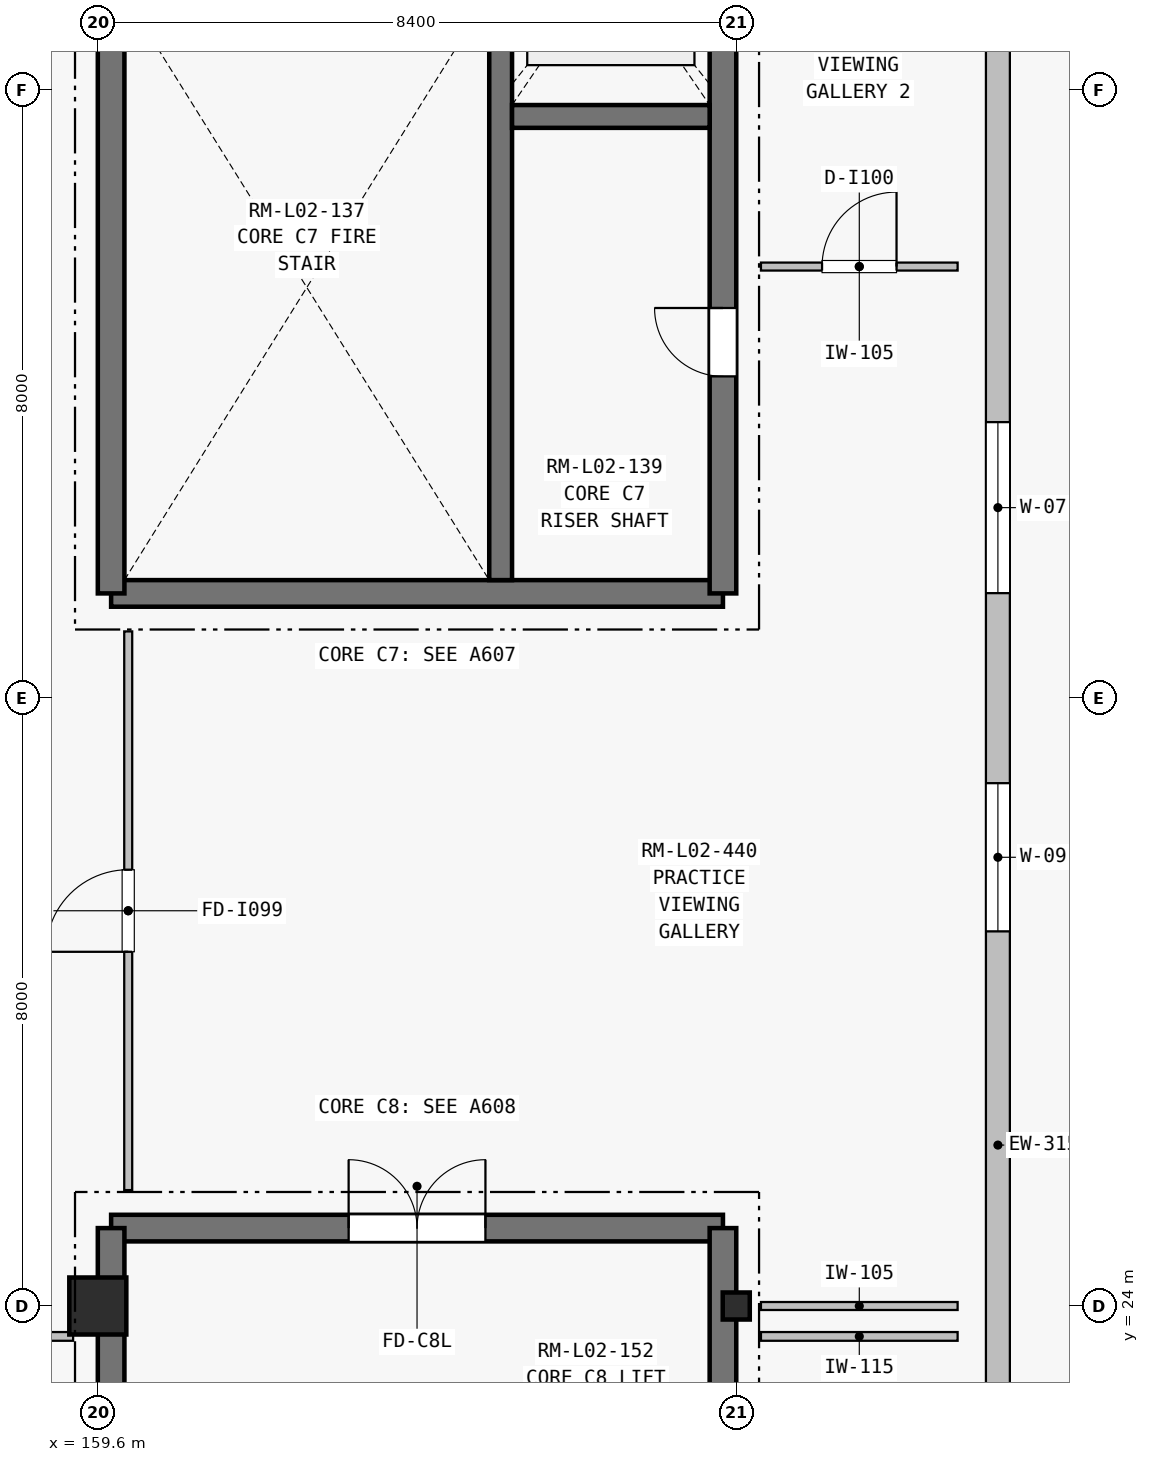
"""IFC4 building model, lengths in metres.
Left out: names, types, materials, properties, quantities, classifications, styles, units other than length and angle.
Written with IfcOpenShell. Run it as: python <this file> out.ifc"""

import sys

from ifc_helpers import new_model, si_unit, direction, frame, frame_2d, origin, origin_2d, place, context, subcontext, project, spatial, rectangle, hollow_circle, extrude, element, fill, save


model = new_model("IFC4")
c1 = context("Model", 3, precision=1e-05, world=origin(), true_north=direction((0.0, 1.0)))
c2 = subcontext(c1, "Body", "Model", "MODEL_VIEW")
j1 = project(units=[si_unit("LENGTHUNIT", "METRE"), si_unit("PLANEANGLEUNIT", "RADIAN")], contexts=[c1])
p1 = place(None, origin())
s1 = spatial("IfcSite", under=j1, at=p1, CompositionType="ELEMENT")
p2 = place(p1, origin())
s2 = spatial("IfcBuilding", under=s1, at=p2, CompositionType="ELEMENT")
p3 = place(p2, frame((0.0, 0.0, 9.9)))
s3 = spatial("IfcBuildingStorey", under=s2, at=p3, CompositionType="ELEMENT", Elevation=9.9)
p4 = place(p3, frame((159.6, 24.0, 0.0), z_axis=(0.0, 0.0, 1.0), x_axis=(1.0, 0.0, 0.0)))
e1 = element("IfcColumn", 1, at=p4, inside=s3, PredefinedType="COLUMN", context=c2, shape_type="SweptSolid", body=[
    extrude(rectangle(XDim=0.75, YDim=0.75, at=origin_2d()), origin(), (0.0, 0.0, 1.0), 4.26),
])
p5 = place(p3, frame((168.0, 24.0, 0.0), z_axis=(0.0, 0.0, 1.0), x_axis=(1.0, 0.0, 0.0)))
e2 = element("IfcColumn", 2, at=p5, inside=s3, PredefinedType="COLUMN", context=c2, shape_type="SweptSolid", body=[
    extrude(hollow_circle(Radius=0.178, WallThickness=0.013, at=origin_2d()), origin(), (0.0, 0.0, 1.0), 4.26),
])
p6 = place(p3, frame((171.442, 46.954, 0.0), z_axis=(0.0, 0.0, 1.0), x_axis=(0.0, -1.0, 0.0)))
e3 = element("IfcWall", 3, at=p6, inside=s3, PredefinedType="SOLIDWALL", context=c2, shape_type="SweptSolid", body=[
    extrude(rectangle(XDim=39.136, YDim=0.315, at=frame_2d((19.568, 0.0))), origin(), (0.0, 0.0, 1.0), 4.26),
])
p7 = place(p6, frame((11.325, 0.0, 0.9)))
e4 = element("IfcOpeningElement", 4, at=p7, cuts=e3, PredefinedType="OPENING", context=c2, shape_type="SweptSolid", body=[
    extrude(rectangle(XDim=2.25, YDim=2.1, at=frame_2d((1.125, 1.05))), frame((0.0, 0.167, 0.0), z_axis=(0.0, -1.0, 0.0), x_axis=(1.0, 0.0, 0.0)), (0.0, 0.0, 1.0), 0.335),
])
p8 = place(p6, frame((16.075, 0.0, 0.9)))
e5 = element("IfcOpeningElement", 5, at=p8, cuts=e3, PredefinedType="OPENING", context=c2, shape_type="SweptSolid", body=[
    extrude(rectangle(XDim=1.95, YDim=2.0, at=frame_2d((0.975, 1.0))), frame((0.0, 0.167, 0.0), z_axis=(0.0, -1.0, 0.0), x_axis=(1.0, 0.0, 0.0)), (0.0, 0.0, 1.0), 0.335),
])
p9 = place(p6, frame((24.9, 0.0, 0.9)))
e6 = element("IfcOpeningElement", 6, at=p9, cuts=e3, PredefinedType="OPENING", context=c2, shape_type="SweptSolid", body=[
    extrude(rectangle(XDim=2.7, YDim=1.55, at=frame_2d((1.35, 0.775))), frame((0.0, 0.167, 0.0), z_axis=(0.0, -1.0, 0.0), x_axis=(1.0, 0.0, 0.0)), (0.0, 0.0, 1.0), 0.335),
])
p10 = place(p6, frame((29.55, 0.0, 0.9)))
e7 = element("IfcOpeningElement", 7, at=p10, cuts=e3, PredefinedType="OPENING", context=c2, shape_type="SweptSolid", body=[
    extrude(rectangle(XDim=2.6, YDim=1.4, at=frame_2d((1.3, 0.7))), frame((0.0, 0.167, 0.0), z_axis=(0.0, -1.0, 0.0), x_axis=(1.0, 0.0, 0.0)), (0.0, 0.0, 1.0), 0.335),
])
p11 = place(p6, frame((34.3, 0.0, 0.9)))
e8 = element("IfcOpeningElement", 8, at=p11, cuts=e3, PredefinedType="OPENING", context=c2, shape_type="SweptSolid", body=[
    extrude(rectangle(XDim=2.3, YDim=1.3, at=frame_2d((1.15, 0.65))), frame((0.0, 0.167, 0.0), z_axis=(0.0, -1.0, 0.0), x_axis=(1.0, 0.0, 0.0)), (0.0, 0.0, 1.0), 0.335),
])
p12 = place(p3, frame((159.775, 33.375, 0.0), z_axis=(0.0, 0.0, 1.0), x_axis=(1.0, 0.0, 0.0)))
e9 = element("IfcWall", 9, at=p12, inside=s3, PredefinedType="SHEAR", context=c2, shape_type="SweptSolid", body=[
    extrude(rectangle(XDim=8.05, YDim=0.35, at=frame_2d((4.025, 0.0))), origin(), (0.0, 0.0, 1.0), 4.5),
])
p13 = place(p3, frame((159.775, 33.375, 0.0), z_axis=(0.0, 0.0, 1.0), x_axis=(0.0, 1.0, 0.0)))
e10 = element("IfcWall", 10, at=p13, inside=s3, PredefinedType="SHEAR", context=c2, shape_type="SweptSolid", body=[
    extrude(rectangle(XDim=14.85, YDim=0.35, at=frame_2d((7.425, 0.0))), origin(), (0.0, 0.0, 1.0), 4.5),
])
p14 = place(p3, frame((167.825, 33.375, 0.0), z_axis=(0.0, 0.0, 1.0), x_axis=(0.0, 1.0, 0.0)))
e11 = element("IfcWall", 11, at=p14, inside=s3, PredefinedType="SHEAR", context=c2, shape_type="SweptSolid", body=[
    extrude(rectangle(XDim=14.85, YDim=0.35, at=frame_2d((7.425, 0.0))), origin(), (0.0, 0.0, 1.0), 4.5),
])
p15 = place(p14, frame((2.855, 0.0, 0.0)))
e12 = element("IfcOpeningElement", 12, at=p15, cuts=e11, PredefinedType="OPENING", context=c2, shape_type="SweptSolid", body=[
    extrude(rectangle(XDim=0.9, YDim=2.1, at=frame_2d((0.45, 1.05))), frame((0.0, 0.185, 0.0), z_axis=(0.0, -1.0, 0.0), x_axis=(1.0, 0.0, 0.0)), (0.0, 0.0, 1.0), 0.37),
])
p16 = place(p3, frame((164.9, 33.55, 0.0), z_axis=(0.0, 0.0, 1.0), x_axis=(0.0, 1.0, 0.0)))
e13 = element("IfcWall", 13, at=p16, inside=s3, PredefinedType="SHEAR", context=c2, shape_type="SweptSolid", body=[
    extrude(rectangle(XDim=10.35, YDim=0.3, at=frame_2d((5.175, 0.0))), origin(), (0.0, 0.0, 1.0), 4.5),
])
p17 = place(p3, frame((165.05, 39.65, 0.0), z_axis=(0.0, 0.0, 1.0), x_axis=(1.0, 0.0, 0.0)))
e14 = element("IfcWall", 14, at=p17, inside=s3, PredefinedType="SHEAR", context=c2, shape_type="SweptSolid", body=[
    extrude(rectangle(XDim=2.6, YDim=0.3, at=frame_2d((1.3, 0.0))), origin(), (0.0, 0.0, 1.0), 4.5),
])
p18 = place(p3, frame((159.775, 25.025, 0.0), z_axis=(0.0, 0.0, 1.0), x_axis=(1.0, 0.0, 0.0)))
e15 = element("IfcWall", 15, at=p18, inside=s3, PredefinedType="SHEAR", context=c2, shape_type="SweptSolid", body=[
    extrude(rectangle(XDim=8.05, YDim=0.35, at=frame_2d((4.025, 0.0))), origin(), (0.0, 0.0, 1.0), 4.5),
])
p19 = place(p18, frame((3.125, 0.0, 0.0)))
e16 = element("IfcOpeningElement", 16, at=p19, cuts=e15, PredefinedType="OPENING", context=c2, shape_type="SweptSolid", body=[
    extrude(rectangle(XDim=1.8, YDim=2.25, at=frame_2d((0.9, 1.125))), frame((0.0, 0.185, 0.0), z_axis=(0.0, -1.0, 0.0), x_axis=(1.0, 0.0, 0.0)), (0.0, 0.0, 1.0), 0.37),
])
p20 = place(p3, frame((159.775, 10.175, 0.0), z_axis=(0.0, 0.0, 1.0), x_axis=(0.0, 1.0, 0.0)))
e17 = element("IfcWall", 17, at=p20, inside=s3, PredefinedType="SHEAR", context=c2, shape_type="SweptSolid", body=[
    extrude(rectangle(XDim=14.85, YDim=0.35, at=frame_2d((7.425, 0.0))), origin(), (0.0, 0.0, 1.0), 4.5),
])
p21 = place(p3, frame((167.825, 10.175, 0.0), z_axis=(0.0, 0.0, 1.0), x_axis=(0.0, 1.0, 0.0)))
e18 = element("IfcWall", 18, at=p21, inside=s3, PredefinedType="SHEAR", context=c2, shape_type="SweptSolid", body=[
    extrude(rectangle(XDim=14.85, YDim=0.35, at=frame_2d((7.425, 0.0))), origin(), (0.0, 0.0, 1.0), 4.5),
])
p22 = place(p21, frame((2.855, 0.0, 0.0)))
e19 = element("IfcOpeningElement", 19, at=p22, cuts=e18, PredefinedType="OPENING", context=c2, shape_type="SweptSolid", body=[
    extrude(rectangle(XDim=0.9, YDim=2.1, at=frame_2d((0.45, 1.05))), frame((0.0, 0.185, 0.0), z_axis=(0.0, -1.0, 0.0), x_axis=(1.0, 0.0, 0.0)), (0.0, 0.0, 1.0), 0.37),
])
p23 = place(p3, frame((168.325, 37.675, 0.0), z_axis=(0.0, 0.0, 1.0), x_axis=(1.0, 0.0, 0.0)))
e20 = element("IfcWall", 20, at=p23, inside=s3, PredefinedType="PARTITIONING", context=c2, shape_type="SweptSolid", body=[
    extrude(rectangle(XDim=2.588, YDim=0.105, at=frame_2d((1.294, 0.0))), origin(), (0.0, 0.0, 1.0), 4.26),
])
p24 = place(p23, frame((0.804, 0.0, 0.0)))
e21 = element("IfcOpeningElement", 21, at=p24, cuts=e20, PredefinedType="OPENING", context=c2, shape_type="SweptSolid", body=[
    extrude(rectangle(XDim=0.98, YDim=2.15, at=frame_2d((0.49, 1.075))), frame((0.0, 0.062, 0.0), z_axis=(0.0, -1.0, 0.0), x_axis=(1.0, 0.0, 0.0)), (0.0, 0.0, 1.0), 0.125),
])
p25 = place(p3, frame((170.913, 24.0, 0.0), z_axis=(0.0, 0.0, 1.0), x_axis=(-1.0, 0.0, 0.0)))
e22 = element("IfcWall", 22, at=p25, inside=s3, PredefinedType="PARTITIONING", context=c2, shape_type="SweptSolid", body=[
    extrude(rectangle(XDim=2.588, YDim=0.105, at=frame_2d((1.294, 0.0))), origin(), (0.0, 0.0, 1.0), 4.26),
])
p26 = place(p3, frame((160.0, 25.525, 0.0), z_axis=(0.0, 0.0, 1.0), x_axis=(0.0, 1.0, 0.0)))
e23 = element("IfcWall", 23, at=p26, inside=s3, PredefinedType="PARTITIONING", context=c2, shape_type="SweptSolid", body=[
    extrude(rectangle(XDim=7.35, YDim=0.105, at=frame_2d((3.675, 0.0))), origin(), (0.0, 0.0, 1.0), 4.26),
])
p27 = place(p26, frame((3.135, 0.0, 0.0)))
e24 = element("IfcOpeningElement", 24, at=p27, cuts=e23, PredefinedType="OPENING", context=c2, shape_type="SweptSolid", body=[
    extrude(rectangle(XDim=1.08, YDim=2.15, at=frame_2d((0.54, 1.075))), frame((0.0, 0.062, 0.0), z_axis=(0.0, -1.0, 0.0), x_axis=(1.0, 0.0, 0.0)), (0.0, 0.0, 1.0), 0.125),
])
p28 = place(p3, frame((156.22, 23.6, 0.0), z_axis=(0.0, 0.0, 1.0), x_axis=(1.0, 0.0, 0.0)))
e25 = element("IfcWall", 25, at=p28, inside=s3, PredefinedType="PARTITIONING", context=c2, shape_type="SweptSolid", body=[
    extrude(rectangle(XDim=3.055, YDim=0.115, at=frame_2d((1.527, 0.0))), origin(), (0.0, 0.0, 1.0), 4.26),
])
p29 = place(p28, frame((0.706, 0.0, 0.0)))
e26 = element("IfcOpeningElement", 26, at=p29, cuts=e25, PredefinedType="OPENING", context=c2, shape_type="SweptSolid", body=[
    extrude(rectangle(XDim=0.98, YDim=2.15, at=frame_2d((0.49, 1.075))), frame((0.0, 0.067, 0.0), z_axis=(0.0, -1.0, 0.0), x_axis=(1.0, 0.0, 0.0)), (0.0, 0.0, 1.0), 0.135),
])
p30 = place(p3, frame((168.325, 23.6, 0.0), z_axis=(0.0, 0.0, 1.0), x_axis=(1.0, 0.0, 0.0)))
e27 = element("IfcWall", 27, at=p30, inside=s3, PredefinedType="PARTITIONING", context=c2, shape_type="SweptSolid", body=[
    extrude(rectangle(XDim=2.588, YDim=0.115, at=frame_2d((1.294, 0.0))), origin(), (0.0, 0.0, 1.0), 4.26),
])
p31 = place(p7, origin())
e28 = element("IfcWindow", 28, at=p31, inside=s3, PartitioningType="SINGLE_PANEL", PredefinedType="WINDOW", context=c2, shape_type="SweptSolid", body=[
    extrude(rectangle(XDim=2.25, YDim=2.1, at=frame_2d((1.125, 1.05))), frame((0.0, 0.03, 0.0), z_axis=(0.0, -1.0, 0.0), x_axis=(1.0, 0.0, 0.0)), (0.0, 0.0, 1.0), 0.06),
])
fill(e4, e28)
p32 = place(p8, origin())
e29 = element("IfcWindow", 29, at=p32, inside=s3, PartitioningType="SINGLE_PANEL", PredefinedType="WINDOW", context=c2, shape_type="SweptSolid", body=[
    extrude(rectangle(XDim=1.95, YDim=2.0, at=frame_2d((0.975, 1.0))), frame((0.0, 0.03, 0.0), z_axis=(0.0, -1.0, 0.0), x_axis=(1.0, 0.0, 0.0)), (0.0, 0.0, 1.0), 0.06),
])
fill(e5, e29)
p33 = place(p15, origin())
e30 = element("IfcDoor", 30, at=p33, inside=s3, OperationType="SINGLE_SWING_RIGHT", PredefinedType="DOOR", context=c2, shape_type="SweptSolid", body=[
    extrude(rectangle(XDim=0.9, YDim=2.1, at=frame_2d((0.45, 1.05))), frame((0.0, 0.025, 0.0), z_axis=(0.0, -1.0, 0.0), x_axis=(1.0, 0.0, 0.0)), (0.0, 0.0, 1.0), 0.05),
])
fill(e12, e30)
p34 = place(p19, origin())
e31 = element("IfcDoor", 31, at=p34, inside=s3, OperationType="DOUBLE_DOOR_SINGLE_SWING", PredefinedType="DOOR", context=c2, shape_type="SweptSolid", body=[
    extrude(rectangle(XDim=1.8, YDim=2.25, at=frame_2d((0.9, 1.125))), frame((0.0, 0.025, 0.0), z_axis=(0.0, -1.0, 0.0), x_axis=(1.0, 0.0, 0.0)), (0.0, 0.0, 1.0), 0.05),
])
fill(e16, e31)
p35 = place(p27, origin())
e32 = element("IfcDoor", 32, at=p35, inside=s3, OperationType="SINGLE_SWING_LEFT", PredefinedType="DOOR", context=c2, shape_type="SweptSolid", body=[
    extrude(rectangle(XDim=1.08, YDim=2.15, at=frame_2d((0.54, 1.075))), frame((0.0, 0.025, 0.0), z_axis=(0.0, -1.0, 0.0), x_axis=(1.0, 0.0, 0.0)), (0.0, 0.0, 1.0), 0.05),
])
fill(e24, e32)
p36 = place(p24, origin())
e33 = element("IfcDoor", 33, at=p36, inside=s3, OperationType="SINGLE_SWING_RIGHT", PredefinedType="DOOR", context=c2, shape_type="SweptSolid", body=[
    extrude(rectangle(XDim=0.98, YDim=2.15, at=frame_2d((0.49, 1.075))), frame((0.0, 0.025, 0.0), z_axis=(0.0, -1.0, 0.0), x_axis=(1.0, 0.0, 0.0)), (0.0, 0.0, 1.0), 0.05),
])
fill(e21, e33)
save(model, sys.argv[1])
